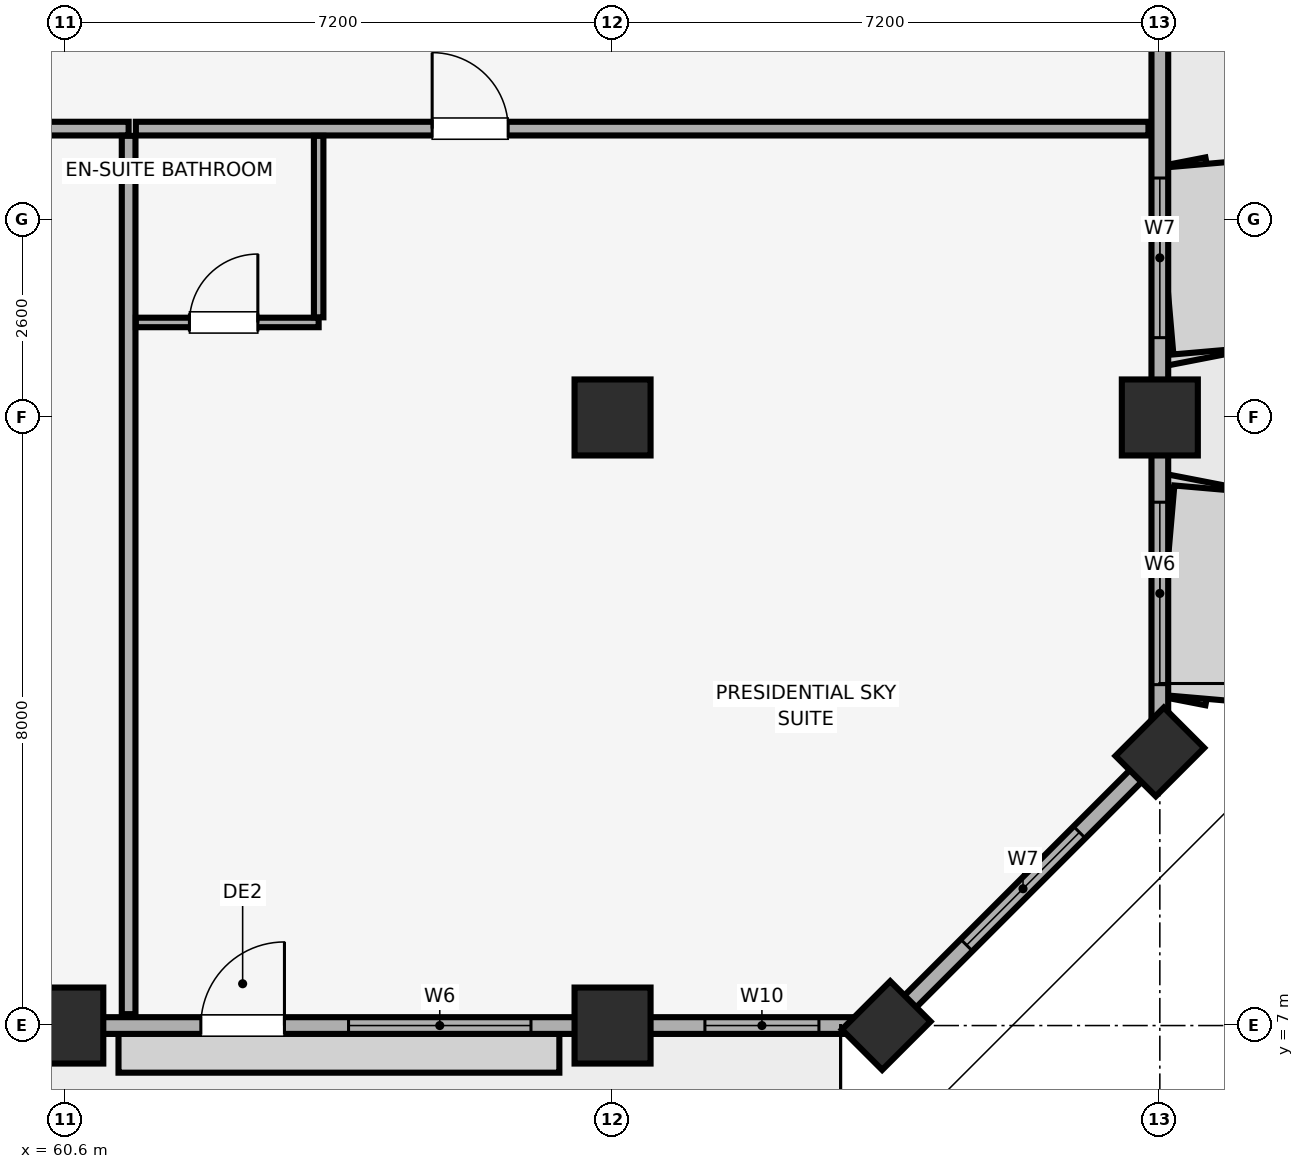
"""IFC4 building model, lengths in metres.
Left out: names, types, materials, properties, quantities, classifications, styles, units other than length and angle.
Written with IfcOpenShell. Run it as: python <this file> out.ifc"""

import sys

from ifc_helpers import new_model, si_unit, direction, frame, frame_2d, origin, origin_2d, place, context, subcontext, project, spatial, rectangle, extrude, element, fill, save


model = new_model("IFC4")
c1 = context("Model", 3, precision=1e-05, world=origin(), true_north=direction((0.0, 1.0)))
c2 = subcontext(c1, "Body", "Model", "MODEL_VIEW")
j1 = project(units=[si_unit("LENGTHUNIT", "METRE"), si_unit("PLANEANGLEUNIT", "RADIAN")], contexts=[c1])
p1 = place(None, origin())
s1 = spatial("IfcSite", under=j1, at=p1, CompositionType="ELEMENT")
p2 = place(p1, origin())
s2 = spatial("IfcBuilding", under=s1, at=p2, CompositionType="ELEMENT")
p3 = place(p2, frame((0.0, 0.0, 285.9)))
s3 = spatial("IfcBuildingStorey", under=s2, at=p3, CompositionType="ELEMENT", Elevation=285.9)
for number, where, z_axis, x_axis in (
    (1, (60.6, 7.0, 0.0), (0.0, 0.0, 1.0), (1.0, 0.0, 0.0)),
    (2, (67.8, 7.0, 0.0), (0.0, 0.0, 1.0), (1.0, 0.0, 0.0)),
    (3, (75.0, 15.0, 0.0), (0.0, 0.0, 1.0), (1.0, 0.0, 0.0)),
):
    element("IfcColumn", number, at=place(p3, frame(where, z_axis=z_axis, x_axis=x_axis)), inside=s3, PredefinedType="COLUMN", context=c2, shape_type="SweptSolid", body=[
        extrude(rectangle(XDim=1.0, YDim=1.0, at=origin_2d()), origin(), (0.0, 0.0, 1.0), 4.1),
    ])
for number, where, z_axis, x_axis in (
    (4, (71.4, 7.0, 0.0), (0.0, 0.0, 1.0), (0.707, 0.707, 0.0)),
    (5, (75.0, 10.6, 0.0), (0.0, 0.0, 1.0), (0.707, 0.707, 0.0)),
):
    element("IfcColumn", number, at=place(p3, frame(where, z_axis=z_axis, x_axis=x_axis)), inside=s3, PredefinedType="PILASTER", context=c2, shape_type="SweptSolid", body=[
        extrude(rectangle(XDim=0.9, YDim=0.75, at=origin_2d()), origin(), (0.0, 0.0, 1.0), 4.1),
    ])
p4 = place(p3, frame((67.8, 15.0, 0.0), z_axis=(0.0, 0.0, 1.0), x_axis=(1.0, 0.0, 0.0)))
e6 = element("IfcColumn", 6, at=p4, inside=s3, PredefinedType="COLUMN", context=c2, shape_type="SweptSolid", body=[
    extrude(rectangle(XDim=1.0, YDim=1.0, at=origin_2d()), origin(), (0.0, 0.0, 1.0), 4.1),
])
p5 = place(p3, frame((12.6, 7.0, 0.0), z_axis=(0.0, 0.0, 1.0), x_axis=(1.0, 0.0, 0.0)))
e7 = element("IfcWall", 7, at=p5, inside=s3, PredefinedType="SOLIDWALL", context=c2, shape_type="SweptSolid", body=[
    extrude(rectangle(XDim=58.8, YDim=0.22, at=frame_2d((29.4, 0.0))), origin(), (0.0, 0.0, 1.0), 3.3),
])
p6 = place(p5, frame((7.917, 0.0, 0.0)))
e8 = element("IfcOpeningElement", 8, at=p6, cuts=e7, PredefinedType="OPENING", context=c2, shape_type="SweptSolid", body=[
    extrude(rectangle(XDim=1.1, YDim=2.15, at=frame_2d((0.55, 1.075))), frame((0.0, 0.12, 0.0), z_axis=(0.0, -1.0, 0.0), x_axis=(1.0, 0.0, 0.0)), (0.0, 0.0, 1.0), 0.24),
])
p7 = place(p5, frame((22.583, 0.0, 0.0)))
e9 = element("IfcOpeningElement", 9, at=p7, cuts=e7, PredefinedType="OPENING", context=c2, shape_type="SweptSolid", body=[
    extrude(rectangle(XDim=1.1, YDim=2.15, at=frame_2d((0.55, 1.075))), frame((0.0, 0.12, 0.0), z_axis=(0.0, -1.0, 0.0), x_axis=(1.0, 0.0, 0.0)), (0.0, 0.0, 1.0), 0.24),
])
p8 = place(p5, frame((49.783, 0.0, 0.0)))
e10 = element("IfcOpeningElement", 10, at=p8, cuts=e7, PredefinedType="OPENING", context=c2, shape_type="SweptSolid", body=[
    extrude(rectangle(XDim=1.1, YDim=2.15, at=frame_2d((0.55, 1.075))), frame((0.0, 0.12, 0.0), z_axis=(0.0, -1.0, 0.0), x_axis=(1.0, 0.0, 0.0)), (0.0, 0.0, 1.0), 0.24),
])
p9 = place(p5, frame((0.885, 0.0, 0.85)))
e11 = element("IfcOpeningElement", 11, at=p9, cuts=e7, PredefinedType="OPENING", context=c2, shape_type="SweptSolid", body=[
    extrude(rectangle(XDim=1.5, YDim=1.4, at=frame_2d((0.75, 0.7))), frame((0.0, 0.12, 0.0), z_axis=(0.0, -1.0, 0.0), x_axis=(1.0, 0.0, 0.0)), (0.0, 0.0, 1.0), 0.24),
])
p10 = place(p5, frame((4.673, 0.0, 0.85)))
e12 = element("IfcOpeningElement", 12, at=p10, cuts=e7, PredefinedType="OPENING", context=c2, shape_type="SweptSolid", body=[
    extrude(rectangle(XDim=2.4, YDim=1.5, at=frame_2d((1.2, 0.75))), frame((0.0, 0.12, 0.0), z_axis=(0.0, -1.0, 0.0), x_axis=(1.0, 0.0, 0.0)), (0.0, 0.0, 1.0), 0.24),
])
p11 = place(p5, frame((12.8, 0.0, 0.85)))
e13 = element("IfcOpeningElement", 13, at=p11, cuts=e7, PredefinedType="OPENING", context=c2, shape_type="SweptSolid", body=[
    extrude(rectangle(XDim=3.2, YDim=1.85, at=frame_2d((1.6, 0.925))), frame((0.0, 0.12, 0.0), z_axis=(0.0, -1.0, 0.0), x_axis=(1.0, 0.0, 0.0)), (0.0, 0.0, 1.0), 0.24),
])
p12 = place(p5, frame((20.298, 0.0, 0.85)))
e14 = element("IfcOpeningElement", 14, at=p12, cuts=e7, PredefinedType="OPENING", context=c2, shape_type="SweptSolid", body=[
    extrude(rectangle(XDim=1.5, YDim=1.4, at=frame_2d((0.75, 0.7))), frame((0.0, 0.12, 0.0), z_axis=(0.0, -1.0, 0.0), x_axis=(1.0, 0.0, 0.0)), (0.0, 0.0, 1.0), 0.24),
])
p13 = place(p5, frame((26.3, 0.0, 0.85)))
e15 = element("IfcOpeningElement", 15, at=p13, cuts=e7, PredefinedType="OPENING", context=c2, shape_type="SweptSolid", body=[
    extrude(rectangle(XDim=2.4, YDim=1.5, at=frame_2d((1.2, 0.75))), frame((0.0, 0.12, 0.0), z_axis=(0.0, -1.0, 0.0), x_axis=(1.0, 0.0, 0.0)), (0.0, 0.0, 1.0), 0.24),
])
p14 = place(p5, frame((30.1, 0.0, 0.85)))
e16 = element("IfcOpeningElement", 16, at=p14, cuts=e7, PredefinedType="OPENING", context=c2, shape_type="SweptSolid", body=[
    extrude(rectangle(XDim=2.4, YDim=1.5, at=frame_2d((1.2, 0.75))), frame((0.0, 0.12, 0.0), z_axis=(0.0, -1.0, 0.0), x_axis=(1.0, 0.0, 0.0)), (0.0, 0.0, 1.0), 0.24),
])
p15 = place(p5, frame((34.958, 0.0, 0.85)))
e17 = element("IfcOpeningElement", 17, at=p15, cuts=e7, PredefinedType="OPENING", context=c2, shape_type="SweptSolid", body=[
    extrude(rectangle(XDim=3.2, YDim=1.85, at=frame_2d((1.6, 0.925))), frame((0.0, 0.12, 0.0), z_axis=(0.0, -1.0, 0.0), x_axis=(1.0, 0.0, 0.0)), (0.0, 0.0, 1.0), 0.24),
])
p16 = place(p5, frame((42.8, 0.0, 0.85)))
e18 = element("IfcOpeningElement", 18, at=p16, cuts=e7, PredefinedType="OPENING", context=c2, shape_type="SweptSolid", body=[
    extrude(rectangle(XDim=3.2, YDim=1.85, at=frame_2d((1.6, 0.925))), frame((0.0, 0.12, 0.0), z_axis=(0.0, -1.0, 0.0), x_axis=(1.0, 0.0, 0.0)), (0.0, 0.0, 1.0), 0.24),
])
p17 = place(p5, frame((51.727, 0.0, 0.85)))
e19 = element("IfcOpeningElement", 19, at=p17, cuts=e7, PredefinedType="OPENING", context=c2, shape_type="SweptSolid", body=[
    extrude(rectangle(XDim=2.4, YDim=1.5, at=frame_2d((1.2, 0.75))), frame((0.0, 0.12, 0.0), z_axis=(0.0, -1.0, 0.0), x_axis=(1.0, 0.0, 0.0)), (0.0, 0.0, 1.0), 0.24),
])
p18 = place(p5, frame((56.415, 0.0, 0.85)))
e20 = element("IfcOpeningElement", 20, at=p18, cuts=e7, PredefinedType="OPENING", context=c2, shape_type="SweptSolid", body=[
    extrude(rectangle(XDim=1.5, YDim=1.4, at=frame_2d((0.75, 0.7))), frame((0.0, 0.12, 0.0), z_axis=(0.0, -1.0, 0.0), x_axis=(1.0, 0.0, 0.0)), (0.0, 0.0, 1.0), 0.24),
])
p19 = place(p3, frame((71.4, 7.0, 0.0), z_axis=(0.0, 0.0, 1.0), x_axis=(0.707106781187, 0.707106781187, 0.0)))
e21 = element("IfcWall", 21, at=p19, inside=s3, PredefinedType="SOLIDWALL", context=c2, shape_type="SweptSolid", body=[
    extrude(rectangle(XDim=5.091, YDim=0.22, at=frame_2d((2.546, 0.0))), origin(), (0.0, 0.0, 1.0), 3.3),
])
p20 = place(p19, frame((1.496, 0.0, 0.85)))
e22 = element("IfcOpeningElement", 22, at=p20, cuts=e21, PredefinedType="OPENING", context=c2, shape_type="SweptSolid", body=[
    extrude(rectangle(XDim=2.1, YDim=1.6, at=frame_2d((1.05, 0.8))), frame((0.0, 0.12, 0.0), z_axis=(0.0, -1.0, 0.0), x_axis=(1.0, 0.0, 0.0)), (0.0, 0.0, 1.0), 0.24),
])
p21 = place(p3, frame((75.0, 10.6, 0.0), z_axis=(0.0, 0.0, 1.0), x_axis=(0.0, 1.0, 0.0)))
e23 = element("IfcWall", 23, at=p21, inside=s3, PredefinedType="SOLIDWALL", context=c2, shape_type="SweptSolid", body=[
    extrude(rectangle(XDim=34.8, YDim=0.22, at=frame_2d((17.4, 0.0))), origin(), (0.0, 0.0, 1.0), 3.3),
])
p22 = place(p21, frame((10.9, 0.0, 0.0)))
e24 = element("IfcOpeningElement", 24, at=p22, cuts=e23, PredefinedType="OPENING", context=c2, shape_type="SweptSolid", body=[
    extrude(rectangle(XDim=1.4, YDim=2.2, at=frame_2d((0.7, 1.1))), frame((0.0, 0.12, 0.0), z_axis=(0.0, -1.0, 0.0), x_axis=(1.0, 0.0, 0.0)), (0.0, 0.0, 1.0), 0.24),
])
p23 = place(p21, frame((0.885, 0.0, 0.85)))
e25 = element("IfcOpeningElement", 25, at=p23, cuts=e23, PredefinedType="OPENING", context=c2, shape_type="SweptSolid", body=[
    extrude(rectangle(XDim=2.4, YDim=1.5, at=frame_2d((1.2, 0.75))), frame((0.0, 0.12, 0.0), z_axis=(0.0, -1.0, 0.0), x_axis=(1.0, 0.0, 0.0)), (0.0, 0.0, 1.0), 0.24),
])
p24 = place(p21, frame((5.45, 0.0, 0.85)))
e26 = element("IfcOpeningElement", 26, at=p24, cuts=e23, PredefinedType="OPENING", context=c2, shape_type="SweptSolid", body=[
    extrude(rectangle(XDim=2.1, YDim=1.6, at=frame_2d((1.05, 0.8))), frame((0.0, 0.12, 0.0), z_axis=(0.0, -1.0, 0.0), x_axis=(1.0, 0.0, 0.0)), (0.0, 0.0, 1.0), 0.24),
])
p25 = place(p21, frame((13.66, 0.0, 0.85)))
e27 = element("IfcOpeningElement", 27, at=p25, cuts=e23, PredefinedType="OPENING", context=c2, shape_type="SweptSolid", body=[
    extrude(rectangle(XDim=3.6, YDim=1.65, at=frame_2d((1.8, 0.825))), frame((0.0, 0.12, 0.0), z_axis=(0.0, -1.0, 0.0), x_axis=(1.0, 0.0, 0.0)), (0.0, 0.0, 1.0), 0.24),
])
p26 = place(p21, frame((20.015, 0.0, 0.85)))
e28 = element("IfcOpeningElement", 28, at=p26, cuts=e23, PredefinedType="OPENING", context=c2, shape_type="SweptSolid", body=[
    extrude(rectangle(XDim=3.0, YDim=1.5, at=frame_2d((1.5, 0.75))), frame((0.0, 0.12, 0.0), z_axis=(0.0, -1.0, 0.0), x_axis=(1.0, 0.0, 0.0)), (0.0, 0.0, 1.0), 0.24),
])
p27 = place(p21, frame((24.785, 0.0, 0.85)))
e29 = element("IfcOpeningElement", 29, at=p27, cuts=e23, PredefinedType="OPENING", context=c2, shape_type="SweptSolid", body=[
    extrude(rectangle(XDim=3.0, YDim=1.5, at=frame_2d((1.5, 0.75))), frame((0.0, 0.12, 0.0), z_axis=(0.0, -1.0, 0.0), x_axis=(1.0, 0.0, 0.0)), (0.0, 0.0, 1.0), 0.24),
])
p28 = place(p21, frame((30.215, 0.0, 0.85)))
e30 = element("IfcOpeningElement", 30, at=p28, cuts=e23, PredefinedType="OPENING", context=c2, shape_type="SweptSolid", body=[
    extrude(rectangle(XDim=3.6, YDim=1.65, at=frame_2d((1.8, 0.825))), frame((0.0, 0.12, 0.0), z_axis=(0.0, -1.0, 0.0), x_axis=(1.0, 0.0, 0.0)), (0.0, 0.0, 1.0), 0.24),
])
p29 = place(p3, frame((51.812, 18.8, 0.0), z_axis=(0.0, 0.0, 1.0), x_axis=(1.0, 0.0, 0.0)))
e31 = element("IfcWall", 31, at=p29, inside=s3, PredefinedType="PARTITIONING", context=c2, shape_type="SweptSolid", body=[
    extrude(rectangle(XDim=9.622, YDim=0.18, at=frame_2d((4.811, 0.0))), origin(), (0.0, 0.0, 1.0), 4.1),
])
p30 = place(p29, frame((5.157, 0.0, 0.0)))
e32 = element("IfcOpeningElement", 32, at=p30, cuts=e31, PredefinedType="OPENING", context=c2, shape_type="SweptSolid", body=[
    extrude(rectangle(XDim=1.0, YDim=2.15, at=frame_2d((0.5, 1.075))), frame((0.0, 0.1, 0.0), z_axis=(0.0, -1.0, 0.0), x_axis=(1.0, 0.0, 0.0)), (0.0, 0.0, 1.0), 0.2),
])
p31 = place(p3, frame((61.433, 7.15, 0.0), z_axis=(0.0, 0.0, 1.0), x_axis=(0.0, 1.0, 0.0)))
e33 = element("IfcWall", 33, at=p31, inside=s3, PredefinedType="PARTITIONING", context=c2, shape_type="SweptSolid", body=[
    extrude(rectangle(XDim=11.555, YDim=0.18, at=frame_2d((5.778, 0.0))), origin(), (0.0, 0.0, 1.0), 3.53),
])
p32 = place(p3, frame((61.528, 18.8, 0.0), z_axis=(0.0, 0.0, 1.0), x_axis=(1.0, 0.0, 0.0)))
e34 = element("IfcWall", 34, at=p32, inside=s3, PredefinedType="PARTITIONING", context=c2, shape_type="SweptSolid", body=[
    extrude(rectangle(XDim=13.322, YDim=0.18, at=frame_2d((6.661, 0.0))), origin(), (0.0, 0.0, 1.0), 4.1),
])
p33 = place(p32, frame((3.898, 0.0, 0.0)))
e35 = element("IfcOpeningElement", 35, at=p33, cuts=e34, PredefinedType="OPENING", context=c2, shape_type="SweptSolid", body=[
    extrude(rectangle(XDim=1.0, YDim=2.15, at=frame_2d((0.5, 1.075))), frame((0.0, 0.1, 0.0), z_axis=(0.0, -1.0, 0.0), x_axis=(1.0, 0.0, 0.0)), (0.0, 0.0, 1.0), 0.2),
])
p34 = place(p3, frame((61.528, 16.25, 0.0), z_axis=(0.0, 0.0, 1.0), x_axis=(1.0, 0.0, 0.0)))
e36 = element("IfcWall", 36, at=p34, inside=s3, PredefinedType="PARTITIONING", context=c2, shape_type="SweptSolid", body=[
    extrude(rectangle(XDim=2.405, YDim=0.125, at=frame_2d((1.203, 0.0))), origin(), (0.0, 0.0, 1.0), 4.1),
])
p35 = place(p34, frame((0.705, 0.0, 0.0)))
e37 = element("IfcOpeningElement", 37, at=p35, cuts=e36, PredefinedType="OPENING", context=c2, shape_type="SweptSolid", body=[
    extrude(rectangle(XDim=0.9, YDim=2.1, at=frame_2d((0.45, 1.05))), frame((0.0, 0.073, 0.0), z_axis=(0.0, -1.0, 0.0), x_axis=(1.0, 0.0, 0.0)), (0.0, 0.0, 1.0), 0.145),
])
p36 = place(p3, frame((63.933, 16.317, 0.0), z_axis=(0.0, 0.0, 1.0), x_axis=(0.0, 1.0, 0.0)))
e38 = element("IfcWall", 38, at=p36, inside=s3, PredefinedType="PARTITIONING", context=c2, shape_type="SweptSolid", body=[
    extrude(rectangle(XDim=2.388, YDim=0.125, at=frame_2d((1.194, 0.0))), origin(), (0.0, 0.0, 1.0), 4.1),
])
p37 = place(p20, origin())
e39 = element("IfcWindow", 39, at=p37, inside=s3, PartitioningType="SINGLE_PANEL", PredefinedType="WINDOW", context=c2, shape_type="SweptSolid", body=[
    extrude(rectangle(XDim=2.1, YDim=1.6, at=frame_2d((1.05, 0.8))), frame((0.0, 0.03, 0.0), z_axis=(0.0, -1.0, 0.0), x_axis=(1.0, 0.0, 0.0)), (0.0, 0.0, 1.0), 0.06),
])
fill(e22, e39)
p38 = place(p8, origin())
e40 = element("IfcDoor", 40, at=p38, inside=s3, OperationType="SINGLE_SWING_RIGHT", PredefinedType="DOOR", context=c2, shape_type="SweptSolid", body=[
    extrude(rectangle(XDim=1.1, YDim=2.15, at=frame_2d((0.55, 1.075))), frame((0.0, 0.025, 0.0), z_axis=(0.0, -1.0, 0.0), x_axis=(1.0, 0.0, 0.0)), (0.0, 0.0, 1.0), 0.05),
])
fill(e10, e40)
p39 = place(p17, origin())
e41 = element("IfcWindow", 41, at=p39, inside=s3, PartitioningType="SINGLE_PANEL", PredefinedType="WINDOW", context=c2, shape_type="SweptSolid", body=[
    extrude(rectangle(XDim=2.4, YDim=1.5, at=frame_2d((1.2, 0.75))), frame((0.0, 0.03, 0.0), z_axis=(0.0, -1.0, 0.0), x_axis=(1.0, 0.0, 0.0)), (0.0, 0.0, 1.0), 0.06),
])
fill(e19, e41)
p40 = place(p18, origin())
e42 = element("IfcWindow", 42, at=p40, inside=s3, PartitioningType="SINGLE_PANEL", PredefinedType="WINDOW", context=c2, shape_type="SweptSolid", body=[
    extrude(rectangle(XDim=1.5, YDim=1.4, at=frame_2d((0.75, 0.7))), frame((0.0, 0.03, 0.0), z_axis=(0.0, -1.0, 0.0), x_axis=(1.0, 0.0, 0.0)), (0.0, 0.0, 1.0), 0.06),
])
fill(e20, e42)
p41 = place(p23, origin())
e43 = element("IfcWindow", 43, at=p41, inside=s3, PartitioningType="SINGLE_PANEL", PredefinedType="WINDOW", context=c2, shape_type="SweptSolid", body=[
    extrude(rectangle(XDim=2.4, YDim=1.5, at=frame_2d((1.2, 0.75))), frame((0.0, 0.03, 0.0), z_axis=(0.0, -1.0, 0.0), x_axis=(1.0, 0.0, 0.0)), (0.0, 0.0, 1.0), 0.06),
])
fill(e25, e43)
p42 = place(p24, origin())
e44 = element("IfcWindow", 44, at=p42, inside=s3, PartitioningType="SINGLE_PANEL", PredefinedType="WINDOW", context=c2, shape_type="SweptSolid", body=[
    extrude(rectangle(XDim=2.1, YDim=1.6, at=frame_2d((1.05, 0.8))), frame((0.0, 0.03, 0.0), z_axis=(0.0, -1.0, 0.0), x_axis=(1.0, 0.0, 0.0)), (0.0, 0.0, 1.0), 0.06),
])
fill(e26, e44)
p43 = place(p33, origin())
e45 = element("IfcDoor", 45, at=p43, inside=s3, OperationType="SINGLE_SWING_LEFT", PredefinedType="DOOR", context=c2, shape_type="SweptSolid", body=[
    extrude(rectangle(XDim=1.0, YDim=2.15, at=frame_2d((0.5, 1.075))), frame((0.0, 0.025, 0.0), z_axis=(0.0, -1.0, 0.0), x_axis=(1.0, 0.0, 0.0)), (0.0, 0.0, 1.0), 0.05),
])
fill(e35, e45)
p44 = place(p35, origin())
e46 = element("IfcDoor", 46, at=p44, inside=s3, OperationType="SINGLE_SWING_RIGHT", PredefinedType="DOOR", context=c2, shape_type="SweptSolid", body=[
    extrude(rectangle(XDim=0.9, YDim=2.1, at=frame_2d((0.45, 1.05))), frame((0.0, 0.025, 0.0), z_axis=(0.0, -1.0, 0.0), x_axis=(1.0, 0.0, 0.0)), (0.0, 0.0, 1.0), 0.05),
])
fill(e37, e46)
save(model, sys.argv[1])
